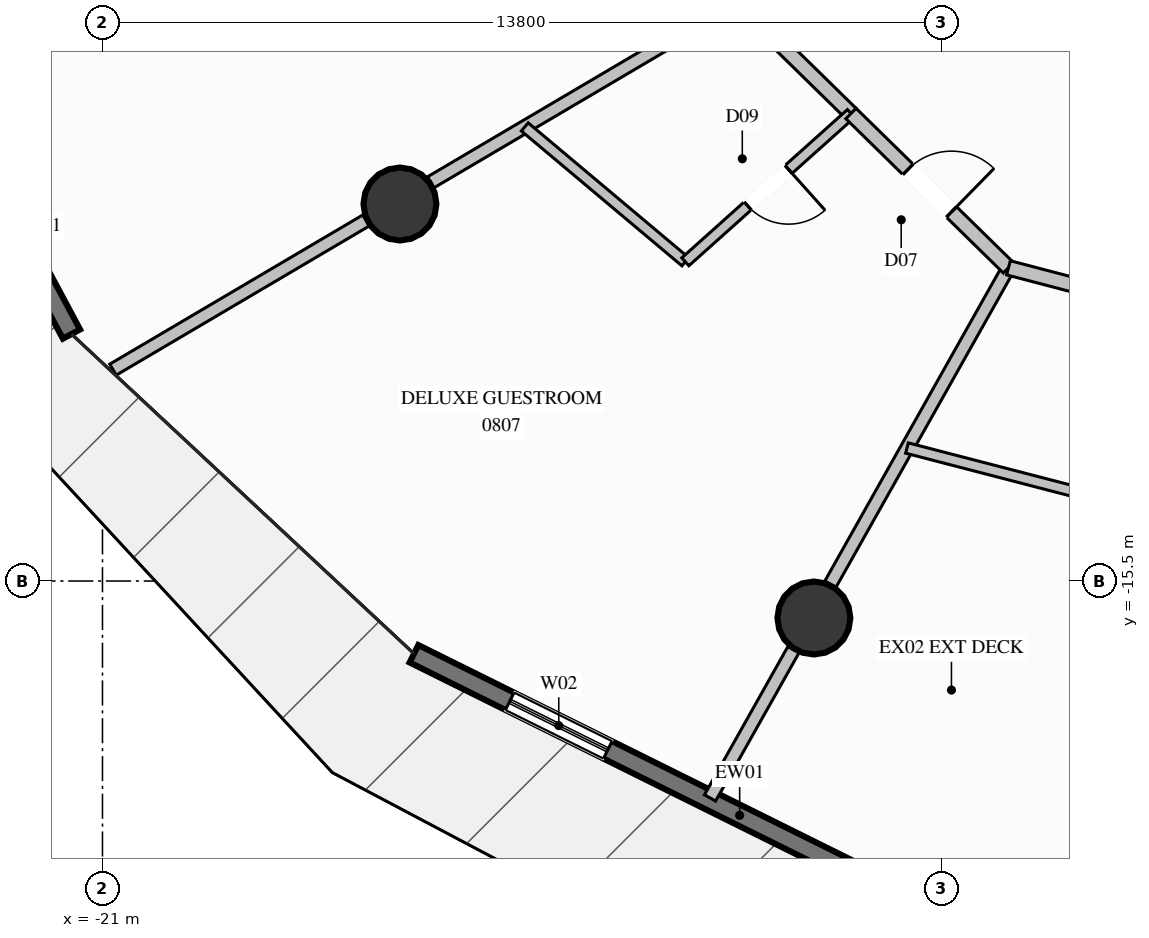
"""IFC4 building model, lengths in metres.
Left out: names, types, materials, properties, quantities, classifications, styles, units other than length and angle.
Written with IfcOpenShell. Run it as: python <this file> out.ifc"""

import sys

from ifc_helpers import new_model, si_unit, direction, frame, frame_2d, origin, origin_2d, place, context, subcontext, project, spatial, rectangle, circle, extrude, element, fill, save


model = new_model("IFC4")
c1 = context("Model", 3, precision=1e-05, world=origin(), true_north=direction((0.0, 1.0)))
c2 = subcontext(c1, "Body", "Model", "MODEL_VIEW")
j1 = project(units=[si_unit("LENGTHUNIT", "METRE"), si_unit("PLANEANGLEUNIT", "RADIAN")], contexts=[c1])
p1 = place(None, origin())
s1 = spatial("IfcSite", under=j1, at=p1, CompositionType="ELEMENT")
p2 = place(p1, origin())
s2 = spatial("IfcBuilding", under=s1, at=p2, CompositionType="ELEMENT")
p3 = place(p2, frame((0.0, 0.0, 32.0)))
s3 = spatial("IfcBuildingStorey", under=s2, at=p3, CompositionType="ELEMENT", Elevation=32.0)
for number, where, z_axis, x_axis in (
    (1, (-16.108, -9.3, 0.0), (0.0, 0.0, 1.0), (1.0, 0.0, 0.0)),
    (2, (-9.3, -16.108, 0.0), (0.0, 0.0, 1.0), (1.0, 0.0, 0.0)),
):
    element("IfcColumn", number, at=place(p3, frame(where, z_axis=z_axis, x_axis=x_axis)), inside=s3, PredefinedType="COLUMN", context=c2, shape_type="SweptSolid", body=[
        extrude(circle(Radius=0.6, at=origin_2d()), origin(), (0.0, 0.0, 1.0), 3.6),
    ])
p4 = place(p3, frame((-21.51, -11.439, 0.0), z_axis=(0.0, 0.0, 1.0), x_axis=(-0.472255130515, 0.881461905985, 0.0)))
e3 = element("IfcWall", 3, at=p4, inside=s3, PredefinedType="SOLIDWALL", context=c2, shape_type="SweptSolid", body=[
    extrude(rectangle(XDim=7.233, YDim=0.32, at=frame_2d((3.617, 0.0))), origin(), (0.0, 0.0, 1.0), 3.34),
])
p5 = place(p4, frame((2.717, 0.0, 0.35)))
e4 = element("IfcOpeningElement", 4, at=p5, cuts=e3, PredefinedType="OPENING", context=c2, shape_type="SweptSolid", body=[
    extrude(rectangle(XDim=1.8, YDim=2.6, at=frame_2d((0.9, 1.3))), frame((0.0, 0.17, 0.0), z_axis=(0.0, -1.0, 0.0), x_axis=(1.0, 0.0, 0.0)), (0.0, 0.0, 1.0), 0.34),
])
p6 = place(p3, frame((-8.576, -20.318, 0.0), z_axis=(0.0, 0.0, 1.0), x_axis=(-0.895818759339, 0.444419565743, 0.0)))
e5 = element("IfcWall", 5, at=p6, inside=s3, PredefinedType="SOLIDWALL", context=c2, shape_type="SweptSolid", body=[
    extrude(rectangle(XDim=8.15, YDim=0.32, at=frame_2d((4.075, 0.0))), origin(), (0.0, 0.0, 1.0), 3.34),
])
p7 = place(p6, frame((4.592, 0.0, 0.35)))
e6 = element("IfcOpeningElement", 6, at=p7, cuts=e5, PredefinedType="OPENING", context=c2, shape_type="SweptSolid", body=[
    extrude(rectangle(XDim=1.8, YDim=2.6, at=frame_2d((0.9, 1.3))), frame((0.0, 0.17, 0.0), z_axis=(0.0, -1.0, 0.0), x_axis=(1.0, 0.0, 0.0)), (0.0, 0.0, 1.0), 0.34),
])
p8 = place(p3, frame((-10.566, -5.975, 0.0), z_axis=(0.0, 0.0, 1.0), x_axis=(-0.861473203585, -0.507803032194, 0.0)))
e7 = element("IfcWall", 7, at=p8, inside=s3, PredefinedType="PARTITIONING", context=c2, shape_type="SweptSolid", body=[
    extrude(rectangle(XDim=5.845, YDim=0.21, at=frame_2d((2.922, 0.0))), origin(), (0.0, 0.0, 1.0), 2.709),
])
p9 = place(p3, frame((-16.666, -9.571, 0.0), z_axis=(0.0, 0.0, 1.0), x_axis=(-0.861454358035, -0.50783500177, 0.0)))
e8 = element("IfcWall", 8, at=p9, inside=s3, PredefinedType="PARTITIONING", context=c2, shape_type="SweptSolid", body=[
    extrude(rectangle(XDim=4.83, YDim=0.21, at=frame_2d((2.415, 0.0))), origin(), (0.0, 0.0, 1.0), 3.34),
])
p10 = place(p3, frame((-6.1, -10.349, 0.0), z_axis=(0.0, 0.0, 1.0), x_axis=(-0.490503945764, -0.871438970433, 0.0)))
e9 = element("IfcWall", 9, at=p10, inside=s3, PredefinedType="PARTITIONING", context=c2, shape_type="SweptSolid", body=[
    extrude(rectangle(XDim=5.969, YDim=0.21, at=frame_2d((2.985, 0.0))), origin(), (0.0, 0.0, 1.0), 2.709),
])
p11 = place(p3, frame((-9.636, -16.629, 0.0), z_axis=(0.0, 0.0, 1.0), x_axis=(-0.490451821351, -0.871468307475, 0.0)))
e10 = element("IfcWall", 10, at=p11, inside=s3, PredefinedType="PARTITIONING", context=c2, shape_type="SweptSolid", body=[
    extrude(rectangle(XDim=2.798, YDim=0.21, at=frame_2d((1.399, 0.0))), origin(), (0.0, 0.0, 1.0), 3.34),
])
p12 = place(p3, frame((-10.566, -5.975, 0.0), z_axis=(0.0, 0.0, 1.0), x_axis=(0.714506552913, -0.699628748584, 0.0)))
e11 = element("IfcWall", 11, at=p12, inside=s3, PredefinedType="PARTITIONING", context=c2, shape_type="SweptSolid", body=[
    extrude(rectangle(XDim=2.625, YDim=0.24, at=frame_2d((1.313, 0.0))), origin(), (0.0, 0.0, 1.0), 3.34),
])
p13 = place(p3, frame((-14.055, -8.032, 0.0), z_axis=(0.0, 0.0, 1.0), x_axis=(0.765749489357, -0.643138958196, 0.0)))
e12 = element("IfcWall", 12, at=p13, inside=s3, PredefinedType="PLUMBINGWALL", context=c2, shape_type="SweptSolid", body=[
    extrude(rectangle(XDim=3.449, YDim=0.175, at=frame_2d((1.724, 0.0))), origin(), (0.0, 0.0, 1.0), 3.34),
])
p14 = place(p3, frame((-8.69, -7.812, 0.0), z_axis=(0.0, 0.0, 1.0), x_axis=(-0.745157470099, -0.666888554975, 0.0)))
e13 = element("IfcWall", 13, at=p14, inside=s3, PredefinedType="PLUMBINGWALL", context=c2, shape_type="SweptSolid", body=[
    extrude(rectangle(XDim=3.656, YDim=0.175, at=frame_2d((1.828, 0.0))), origin(), (0.0, 0.0, 1.0), 3.34),
])
p15 = place(p14, frame((1.378, 0.0, 0.0)))
e14 = element("IfcOpeningElement", 14, at=p15, cuts=e13, PredefinedType="OPENING", context=c2, shape_type="SweptSolid", body=[
    extrude(rectangle(XDim=0.9, YDim=2.1, at=frame_2d((0.45, 1.05))), frame((0.0, 0.098, 0.0), z_axis=(0.0, -1.0, 0.0), x_axis=(1.0, 0.0, 0.0)), (0.0, 0.0, 1.0), 0.195),
])
p16 = place(p3, frame((-8.69, -7.812, 0.0), z_axis=(0.0, 0.0, 1.0), x_axis=(0.714342093268, -0.699796666029, 0.0)))
e15 = element("IfcWall", 15, at=p16, inside=s3, PredefinedType="PARTITIONING", context=c2, shape_type="SweptSolid", body=[
    extrude(rectangle(XDim=3.625, YDim=0.24, at=frame_2d((1.813, 0.0))), origin(), (0.0, 0.0, 1.0), 3.34),
])
p17 = place(p16, frame((1.313, 0.0, 0.0)))
e16 = element("IfcOpeningElement", 16, at=p17, cuts=e15, PredefinedType="OPENING", context=c2, shape_type="SweptSolid", body=[
    extrude(rectangle(XDim=1.0, YDim=2.2, at=frame_2d((0.5, 1.1))), frame((0.0, 0.13, 0.0), z_axis=(0.0, -1.0, 0.0), x_axis=(1.0, 0.0, 0.0)), (0.0, 0.0, 1.0), 0.26),
])
p18 = place(p3, frame((-6.1, -10.349, 0.0), z_axis=(0.0, 0.0, 1.0), x_axis=(0.967291490053, -0.253667446219, 0.0)))
e17 = element("IfcWall", 17, at=p18, inside=s3, PredefinedType="PARTITIONING", context=c2, shape_type="SweptSolid", body=[
    extrude(rectangle(XDim=2.649, YDim=0.24, at=frame_2d((1.324, 0.0))), origin(), (0.0, 0.0, 1.0), 3.34),
])
p19 = place(p3, frame((-7.769, -13.313, 0.0), z_axis=(0.0, 0.0, 1.0), x_axis=(0.96792648556, -0.251233593596, 0.0)))
e18 = element("IfcWall", 18, at=p19, inside=s3, PredefinedType="PLUMBINGWALL", context=c2, shape_type="SweptSolid", body=[
    extrude(rectangle(XDim=3.371, YDim=0.175, at=frame_2d((1.686, 0.0))), origin(), (0.0, 0.0, 1.0), 3.34),
])
p20 = place(p7, origin())
e19 = element("IfcWindow", 19, at=p20, inside=s3, PartitioningType="SINGLE_PANEL", PredefinedType="WINDOW", context=c2, shape_type="SweptSolid", body=[
    extrude(rectangle(XDim=1.8, YDim=2.6, at=frame_2d((0.9, 1.3))), frame((0.0, 0.03, 0.0), z_axis=(0.0, -1.0, 0.0), x_axis=(1.0, 0.0, 0.0)), (0.0, 0.0, 1.0), 0.06),
])
fill(e6, e19)
p21 = place(p15, origin())
e20 = element("IfcDoor", 20, at=p21, inside=s3, OperationType="SINGLE_SWING_LEFT", PredefinedType="DOOR", context=c2, shape_type="SweptSolid", body=[
    extrude(rectangle(XDim=0.9, YDim=2.1, at=frame_2d((0.45, 1.05))), frame((0.0, 0.025, 0.0), z_axis=(0.0, -1.0, 0.0), x_axis=(1.0, 0.0, 0.0)), (0.0, 0.0, 1.0), 0.05),
])
fill(e14, e20)
p22 = place(p17, origin())
e21 = element("IfcDoor", 21, at=p22, inside=s3, OperationType="SINGLE_SWING_RIGHT", PredefinedType="DOOR", context=c2, shape_type="SweptSolid", body=[
    extrude(rectangle(XDim=1.0, YDim=2.2, at=frame_2d((0.5, 1.1))), frame((0.0, 0.025, 0.0), z_axis=(0.0, -1.0, 0.0), x_axis=(1.0, 0.0, 0.0)), (0.0, 0.0, 1.0), 0.05),
])
fill(e16, e21)
save(model, sys.argv[1])
